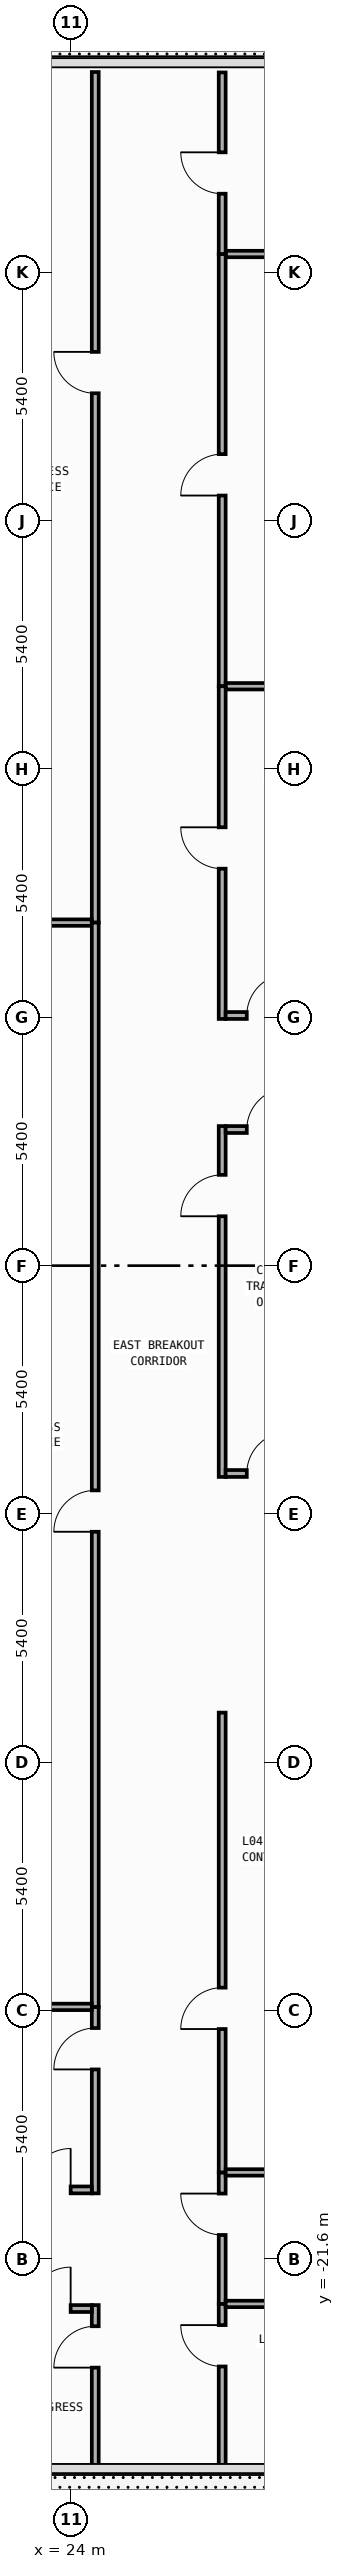
"""IFC4 building model, lengths in metres.
Left out: names, types, materials, properties, quantities, classifications, styles, units other than length and angle.
Written with IfcOpenShell. Run it as: python <this file> out.ifc"""

import sys

from ifc_helpers import new_model, si_unit, direction, frame, frame_2d, origin, place, context, subcontext, project, spatial, rectangle, extrude, element, fill, save


model = new_model("IFC4")
c1 = context("Model", 3, precision=1e-05, world=origin(), true_north=direction((0.0, 1.0)))
c2 = subcontext(c1, "Body", "Model", "MODEL_VIEW")
j1 = project(units=[si_unit("LENGTHUNIT", "METRE"), si_unit("PLANEANGLEUNIT", "RADIAN")], contexts=[c1])
p1 = place(None, origin())
s1 = spatial("IfcSite", under=j1, at=p1, CompositionType="ELEMENT")
p2 = place(p1, origin())
s2 = spatial("IfcBuilding", under=s1, at=p2, CompositionType="ELEMENT")
p3 = place(p2, frame((0.0, 0.0, 16.0)))
s3 = spatial("IfcBuildingStorey", under=s2, at=p3, CompositionType="ELEMENT", Elevation=16.0)
p4 = place(p3, frame((24.52, -26.113, 0.0), z_axis=(0.0, 0.0, 1.0), x_axis=(0.0, 1.0, 0.0)))
e1 = element("IfcWall", 1, at=p4, inside=s3, PredefinedType="PARTITIONING", context=c2, shape_type="SweptSolid", body=[
    extrude(rectangle(XDim=3.508, YDim=0.15, at=frame_2d((1.754, 0.0))), origin(), (0.0, 0.0, 1.0), 4.55),
])
p5 = place(p4, frame((2.148, 0.0, 0.0)))
e2 = element("IfcOpeningElement", 2, at=p5, cuts=e1, PredefinedType="OPENING", context=c2, shape_type="SweptSolid", body=[
    extrude(rectangle(XDim=0.9, YDim=2.15, at=frame_2d((0.45, 1.075))), frame((0.0, 0.085, 0.0), z_axis=(0.0, -1.0, 0.0), x_axis=(1.0, 0.0, 0.0)), (0.0, 0.0, 1.0), 0.17),
])
p6 = place(p3, frame((20.51, -22.68, 0.0), z_axis=(0.0, 0.0, 1.0), x_axis=(1.0, 0.0, 0.0)))
e3 = element("IfcWall", 3, at=p6, inside=s3, PredefinedType="PARTITIONING", context=c2, shape_type="SweptSolid", body=[
    extrude(rectangle(XDim=3.935, YDim=0.15, at=frame_2d((1.968, 0.0))), origin(), (0.0, 0.0, 1.0), 4.55),
])
p7 = place(p6, frame((2.575, 0.0, 0.0)))
e4 = element("IfcOpeningElement", 4, at=p7, cuts=e3, PredefinedType="OPENING", context=c2, shape_type="SweptSolid", body=[
    extrude(rectangle(XDim=0.9, YDim=2.15, at=frame_2d((0.45, 1.075))), frame((0.0, 0.085, 0.0), z_axis=(0.0, -1.0, 0.0), x_axis=(1.0, 0.0, 0.0)), (0.0, 0.0, 1.0), 0.17),
])
p8 = place(p3, frame((27.355, 22.0, 0.0), z_axis=(0.0, 0.0, 1.0), x_axis=(1.0, 0.0, 0.0)))
e5 = element("IfcWall", 5, at=p8, inside=s3, PredefinedType="PARTITIONING", context=c2, shape_type="SweptSolid", body=[
    extrude(rectangle(XDim=9.09, YDim=0.14, at=frame_2d((4.545, 0.0))), origin(), (0.0, 0.0, 1.0), 3.65),
])
p9 = place(p3, frame((27.28, 12.6, 0.0), z_axis=(0.0, 0.0, 1.0), x_axis=(0.0, 1.0, 0.0)))
e6 = element("IfcWall", 6, at=p9, inside=s3, PredefinedType="PARTITIONING", context=c2, shape_type="SweptSolid", body=[
    extrude(rectangle(XDim=9.4, YDim=0.15, at=frame_2d((4.7, 0.0))), origin(), (0.0, 0.0, 1.0), 4.55),
])
p10 = place(p9, frame((4.148, 0.0, 0.0)))
e7 = element("IfcOpeningElement", 7, at=p10, cuts=e6, PredefinedType="OPENING", context=c2, shape_type="SweptSolid", body=[
    extrude(rectangle(XDim=0.9, YDim=2.15, at=frame_2d((0.45, 1.075))), frame((0.0, 0.085, 0.0), z_axis=(0.0, -1.0, 0.0), x_axis=(1.0, 0.0, 0.0)), (0.0, 0.0, 1.0), 0.17),
])
p11 = place(p3, frame((27.355, 12.6, 0.0), z_axis=(0.0, 0.0, 1.0), x_axis=(1.0, 0.0, 0.0)))
e8 = element("IfcWall", 8, at=p11, inside=s3, PredefinedType="PARTITIONING", context=c2, shape_type="SweptSolid", body=[
    extrude(rectangle(XDim=2.645, YDim=0.14, at=frame_2d((1.323, 0.0))), origin(), (0.0, 0.0, 1.0), 3.65),
])
p12 = place(p3, frame((24.52, 7.46, 0.0), z_axis=(0.0, 0.0, 1.0), x_axis=(0.0, 1.0, 0.0)))
e9 = element("IfcWall", 9, at=p12, inside=s3, PredefinedType="PARTITIONING", context=c2, shape_type="SweptSolid", body=[
    extrude(rectangle(XDim=18.498, YDim=0.15, at=frame_2d((9.249, 0.0))), origin(), (0.0, 0.0, 1.0), 4.55),
])
p13 = place(p12, frame((11.512, 0.0, 0.0)))
e10 = element("IfcOpeningElement", 10, at=p13, cuts=e9, PredefinedType="OPENING", context=c2, shape_type="SweptSolid", body=[
    extrude(rectangle(XDim=0.9, YDim=2.15, at=frame_2d((0.45, 1.075))), frame((0.0, 0.085, 0.0), z_axis=(0.0, -1.0, 0.0), x_axis=(1.0, 0.0, 0.0)), (0.0, 0.0, 1.0), 0.17),
])
p14 = place(p3, frame((20.31, 7.46, 0.0), z_axis=(0.0, 0.0, 1.0), x_axis=(1.0, 0.0, 0.0)))
e11 = element("IfcWall", 11, at=p14, inside=s3, PredefinedType="PARTITIONING", context=c2, shape_type="SweptSolid", body=[
    extrude(rectangle(XDim=4.135, YDim=0.14, at=frame_2d((2.067, 0.0))), origin(), (0.0, 0.0, 1.0), 4.55),
])
p15 = place(p3, frame((27.28, 22.0, 0.0), z_axis=(0.0, 0.0, 1.0), x_axis=(0.0, 1.0, 0.0)))
e12 = element("IfcWall", 12, at=p15, inside=s3, PredefinedType="PARTITIONING", context=c2, shape_type="SweptSolid", body=[
    extrude(rectangle(XDim=3.949, YDim=0.15, at=frame_2d((1.975, 0.0))), origin(), (0.0, 0.0, 1.0), 4.55),
])
p16 = place(p15, frame((1.312, 0.0, 0.0)))
e13 = element("IfcOpeningElement", 13, at=p16, cuts=e12, PredefinedType="OPENING", context=c2, shape_type="SweptSolid", body=[
    extrude(rectangle(XDim=0.9, YDim=2.15, at=frame_2d((0.45, 1.075))), frame((0.0, 0.085, 0.0), z_axis=(0.0, -1.0, 0.0), x_axis=(1.0, 0.0, 0.0)), (0.0, 0.0, 1.0), 0.17),
])
p17 = place(p3, frame((27.28, -4.595, 0.0), z_axis=(0.0, 0.0, 1.0), x_axis=(0.0, 1.0, 0.0)))
e14 = element("IfcWall", 14, at=p17, inside=s3, PredefinedType="PARTITIONING", context=c2, shape_type="SweptSolid", body=[
    extrude(rectangle(XDim=7.63, YDim=0.15, at=frame_2d((3.815, 0.0))), origin(), (0.0, 0.0, 1.0), 4.55),
])
p18 = place(p17, frame((5.669, 0.0, 0.0)))
e15 = element("IfcOpeningElement", 15, at=p18, cuts=e14, PredefinedType="OPENING", context=c2, shape_type="SweptSolid", body=[
    extrude(rectangle(XDim=0.9, YDim=2.15, at=frame_2d((0.45, 1.075))), frame((0.0, 0.085, 0.0), z_axis=(0.0, -1.0, 0.0), x_axis=(1.0, 0.0, 0.0)), (0.0, 0.0, 1.0), 0.17),
])
p19 = place(p3, frame((27.28, 5.365, 0.0), z_axis=(0.0, 0.0, 1.0), x_axis=(0.0, 1.0, 0.0)))
e16 = element("IfcWall", 16, at=p19, inside=s3, PredefinedType="PARTITIONING", context=c2, shape_type="SweptSolid", body=[
    extrude(rectangle(XDim=7.235, YDim=0.15, at=frame_2d((3.618, 0.0))), origin(), (0.0, 0.0, 1.0), 4.55),
])
p20 = place(p19, frame((3.268, 0.0, 0.0)))
e17 = element("IfcOpeningElement", 17, at=p20, cuts=e16, PredefinedType="OPENING", context=c2, shape_type="SweptSolid", body=[
    extrude(rectangle(XDim=0.9, YDim=2.15, at=frame_2d((0.45, 1.075))), frame((0.0, 0.085, 0.0), z_axis=(0.0, -1.0, 0.0), x_axis=(1.0, 0.0, 0.0)), (0.0, 0.0, 1.0), 0.17),
])
p21 = place(p3, frame((24.52, -20.175, 0.0), z_axis=(0.0, 0.0, 1.0), x_axis=(0.0, 1.0, 0.0)))
e18 = element("IfcWall", 18, at=p21, inside=s3, PredefinedType="PARTITIONING", context=c2, shape_type="SweptSolid", body=[
    extrude(rectangle(XDim=4.055, YDim=0.15, at=frame_2d((2.027, 0.0))), origin(), (0.0, 0.0, 1.0), 4.55),
])
p22 = place(p21, frame((2.695, 0.0, 0.0)))
e19 = element("IfcOpeningElement", 19, at=p22, cuts=e18, PredefinedType="OPENING", context=c2, shape_type="SweptSolid", body=[
    extrude(rectangle(XDim=0.9, YDim=2.15, at=frame_2d((0.45, 1.075))), frame((0.0, 0.085, 0.0), z_axis=(0.0, -1.0, 0.0), x_axis=(1.0, 0.0, 0.0)), (0.0, 0.0, 1.0), 0.17),
])
p23 = place(p3, frame((27.28, -22.58, 0.0), z_axis=(0.0, 0.0, 1.0), x_axis=(0.0, 1.0, 0.0)))
e20 = element("IfcWall", 20, at=p23, inside=s3, PredefinedType="PARTITIONING", context=c2, shape_type="SweptSolid", body=[
    extrude(rectangle(XDim=2.86, YDim=0.15, at=frame_2d((1.43, 0.0))), origin(), (0.0, 0.0, 1.0), 4.55),
])
p24 = place(p23, frame((1.5, 0.0, 0.0)))
e21 = element("IfcOpeningElement", 21, at=p24, cuts=e20, PredefinedType="OPENING", context=c2, shape_type="SweptSolid", body=[
    extrude(rectangle(XDim=0.9, YDim=2.15, at=frame_2d((0.45, 1.075))), frame((0.0, 0.085, 0.0), z_axis=(0.0, -1.0, 0.0), x_axis=(1.0, 0.0, 0.0)), (0.0, 0.0, 1.0), 0.17),
])
p25 = place(p3, frame((24.52, -16.12, 0.0), z_axis=(0.0, 0.0, 1.0), x_axis=(0.0, 1.0, 0.0)))
e22 = element("IfcWall", 22, at=p25, inside=s3, PredefinedType="PARTITIONING", context=c2, shape_type="SweptSolid", body=[
    extrude(rectangle(XDim=23.58, YDim=0.15, at=frame_2d((11.79, 0.0))), origin(), (0.0, 0.0, 1.0), 4.55),
])
p26 = place(p25, frame((10.333, 0.0, 0.0)))
e23 = element("IfcOpeningElement", 23, at=p26, cuts=e22, PredefinedType="OPENING", context=c2, shape_type="SweptSolid", body=[
    extrude(rectangle(XDim=0.9, YDim=2.15, at=frame_2d((0.45, 1.075))), frame((0.0, 0.085, 0.0), z_axis=(0.0, -1.0, 0.0), x_axis=(1.0, 0.0, 0.0)), (0.0, 0.0, 1.0), 0.17),
])
p27 = place(p3, frame((27.28, -26.121, 0.0), z_axis=(0.0, 0.0, 1.0), x_axis=(0.0, 1.0, 0.0)))
e24 = element("IfcWall", 24, at=p27, inside=s3, PredefinedType="PARTITIONING", context=c2, shape_type="SweptSolid", body=[
    extrude(rectangle(XDim=3.541, YDim=0.15, at=frame_2d((1.771, 0.0))), origin(), (0.0, 0.0, 1.0), 4.55),
])
p28 = place(p27, frame((2.181, 0.0, 0.0)))
e25 = element("IfcOpeningElement", 25, at=p28, cuts=e24, PredefinedType="OPENING", context=c2, shape_type="SweptSolid", body=[
    extrude(rectangle(XDim=0.9, YDim=2.15, at=frame_2d((0.45, 1.075))), frame((0.0, 0.085, 0.0), z_axis=(0.0, -1.0, 0.0), x_axis=(1.0, 0.0, 0.0)), (0.0, 0.0, 1.0), 0.17),
])
p29 = place(p3, frame((27.28, -19.72, 0.0), z_axis=(0.0, 0.0, 1.0), x_axis=(0.0, 1.0, 0.0)))
e26 = element("IfcWall", 26, at=p29, inside=s3, PredefinedType="PARTITIONING", context=c2, shape_type="SweptSolid", body=[
    extrude(rectangle(XDim=10.0, YDim=0.15, at=frame_2d((5.0, 0.0))), origin(), (0.0, 0.0, 1.0), 4.55),
])
p30 = place(p29, frame((3.118, 0.0, 0.0)))
e27 = element("IfcOpeningElement", 27, at=p30, cuts=e26, PredefinedType="OPENING", context=c2, shape_type="SweptSolid", body=[
    extrude(rectangle(XDim=0.9, YDim=2.15, at=frame_2d((0.45, 1.075))), frame((0.0, 0.085, 0.0), z_axis=(0.0, -1.0, 0.0), x_axis=(1.0, 0.0, 0.0)), (0.0, 0.0, 1.0), 0.17),
])
p31 = place(p3, frame((27.355, 2.96, 0.0), z_axis=(0.0, 0.0, 1.0), x_axis=(1.0, 0.0, 0.0)))
e28 = element("IfcWall", 28, at=p31, inside=s3, PredefinedType="PARTITIONING", context=c2, shape_type="SweptSolid", body=[
    extrude(rectangle(XDim=2.645, YDim=0.15, at=frame_2d((1.323, 0.0))), origin(), (0.0, 0.0, 1.0), 4.55),
])
p32 = place(p31, frame((0.46, 0.0, 0.0)))
e29 = element("IfcOpeningElement", 29, at=p32, cuts=e28, PredefinedType="OPENING", context=c2, shape_type="SweptSolid", body=[
    extrude(rectangle(XDim=0.9, YDim=2.15, at=frame_2d((0.45, 1.075))), frame((0.0, 0.085, 0.0), z_axis=(0.0, -1.0, 0.0), x_axis=(1.0, 0.0, 0.0)), (0.0, 0.0, 1.0), 0.17),
])
p33 = place(p3, frame((27.355, 5.44, 0.0), z_axis=(0.0, 0.0, 1.0), x_axis=(1.0, 0.0, 0.0)))
e30 = element("IfcWall", 30, at=p33, inside=s3, PredefinedType="PARTITIONING", context=c2, shape_type="SweptSolid", body=[
    extrude(rectangle(XDim=2.645, YDim=0.15, at=frame_2d((1.323, 0.0))), origin(), (0.0, 0.0, 1.0), 3.65),
])
p34 = place(p33, frame((0.46, 0.0, 0.0)))
e31 = element("IfcOpeningElement", 31, at=p34, cuts=e30, PredefinedType="OPENING", context=c2, shape_type="SweptSolid", body=[
    extrude(rectangle(XDim=0.9, YDim=2.15, at=frame_2d((0.45, 1.075))), frame((0.0, 0.085, 0.0), z_axis=(0.0, -1.0, 0.0), x_axis=(1.0, 0.0, 0.0)), (0.0, 0.0, 1.0), 0.17),
])
p35 = place(p3, frame((20.56, -20.1, 0.0), z_axis=(0.0, 0.0, 1.0), x_axis=(1.0, 0.0, 0.0)))
e32 = element("IfcWall", 32, at=p35, inside=s3, PredefinedType="PARTITIONING", context=c2, shape_type="SweptSolid", body=[
    extrude(rectangle(XDim=3.885, YDim=0.15, at=frame_2d((1.942, 0.0))), origin(), (0.0, 0.0, 1.0), 4.55),
])
p36 = place(p35, frame((2.525, 0.0, 0.0)))
e33 = element("IfcOpeningElement", 33, at=p36, cuts=e32, PredefinedType="OPENING", context=c2, shape_type="SweptSolid", body=[
    extrude(rectangle(XDim=0.9, YDim=2.15, at=frame_2d((0.45, 1.075))), frame((0.0, 0.085, 0.0), z_axis=(0.0, -1.0, 0.0), x_axis=(1.0, 0.0, 0.0)), (0.0, 0.0, 1.0), 0.17),
])
p37 = place(p3, frame((27.355, -4.52, 0.0), z_axis=(0.0, 0.0, 1.0), x_axis=(1.0, 0.0, 0.0)))
e34 = element("IfcWall", 34, at=p37, inside=s3, PredefinedType="PARTITIONING", context=c2, shape_type="SweptSolid", body=[
    extrude(rectangle(XDim=2.645, YDim=0.15, at=frame_2d((1.323, 0.0))), origin(), (0.0, 0.0, 1.0), 4.55),
])
p38 = place(p37, frame((0.46, 0.0, 0.0)))
e35 = element("IfcOpeningElement", 35, at=p38, cuts=e34, PredefinedType="OPENING", context=c2, shape_type="SweptSolid", body=[
    extrude(rectangle(XDim=0.9, YDim=2.15, at=frame_2d((0.45, 1.075))), frame((0.0, 0.085, 0.0), z_axis=(0.0, -1.0, 0.0), x_axis=(1.0, 0.0, 0.0)), (0.0, 0.0, 1.0), 0.17),
])
p39 = place(p3, frame((20.4, -16.12, 0.0), z_axis=(0.0, 0.0, 1.0), x_axis=(1.0, 0.0, 0.0)))
e36 = element("IfcWall", 36, at=p39, inside=s3, PredefinedType="PARTITIONING", context=c2, shape_type="SweptSolid", body=[
    extrude(rectangle(XDim=4.045, YDim=0.14, at=frame_2d((2.022, 0.0))), origin(), (0.0, 0.0, 1.0), 4.55),
])
p40 = place(p3, frame((27.355, -22.58, 0.0), z_axis=(0.0, 0.0, 1.0), x_axis=(1.0, 0.0, 0.0)))
e37 = element("IfcWall", 37, at=p40, inside=s3, PredefinedType="PARTITIONING", context=c2, shape_type="SweptSolid", body=[
    extrude(rectangle(XDim=3.085, YDim=0.14, at=frame_2d((1.542, 0.0))), origin(), (0.0, 0.0, 1.0), 4.55),
])
p41 = place(p3, frame((27.355, -19.72, 0.0), z_axis=(0.0, 0.0, 1.0), x_axis=(1.0, 0.0, 0.0)))
e38 = element("IfcWall", 38, at=p41, inside=s3, PredefinedType="PARTITIONING", context=c2, shape_type="SweptSolid", body=[
    extrude(rectangle(XDim=2.975, YDim=0.14, at=frame_2d((1.488, 0.0))), origin(), (0.0, 0.0, 1.0), 4.55),
])
p42 = place(p5, origin())
e39 = element("IfcDoor", 39, at=p42, inside=s3, OperationType="SINGLE_SWING_LEFT", PredefinedType="DOOR", context=c2, shape_type="SweptSolid", body=[
    extrude(rectangle(XDim=0.9, YDim=2.15, at=frame_2d((0.45, 1.075))), frame((0.0, 0.025, 0.0), z_axis=(0.0, -1.0, 0.0), x_axis=(1.0, 0.0, 0.0)), (0.0, 0.0, 1.0), 0.05),
])
fill(e2, e39)
p43 = place(p7, origin())
e40 = element("IfcDoor", 40, at=p43, inside=s3, OperationType="SINGLE_SWING_RIGHT", PredefinedType="DOOR", context=c2, shape_type="SweptSolid", body=[
    extrude(rectangle(XDim=0.9, YDim=2.15, at=frame_2d((0.45, 1.075))), frame((0.0, 0.025, 0.0), z_axis=(0.0, -1.0, 0.0), x_axis=(1.0, 0.0, 0.0)), (0.0, 0.0, 1.0), 0.05),
])
fill(e4, e40)
p44 = place(p10, origin())
e41 = element("IfcDoor", 41, at=p44, inside=s3, OperationType="SINGLE_SWING_LEFT", PredefinedType="DOOR", context=c2, shape_type="SweptSolid", body=[
    extrude(rectangle(XDim=0.9, YDim=2.15, at=frame_2d((0.45, 1.075))), frame((0.0, 0.025, 0.0), z_axis=(0.0, -1.0, 0.0), x_axis=(1.0, 0.0, 0.0)), (0.0, 0.0, 1.0), 0.05),
])
fill(e7, e41)
p45 = place(p13, origin())
e42 = element("IfcDoor", 42, at=p45, inside=s3, OperationType="SINGLE_SWING_RIGHT", PredefinedType="DOOR", context=c2, shape_type="SweptSolid", body=[
    extrude(rectangle(XDim=0.9, YDim=2.15, at=frame_2d((0.45, 1.075))), frame((0.0, 0.025, 0.0), z_axis=(0.0, -1.0, 0.0), x_axis=(1.0, 0.0, 0.0)), (0.0, 0.0, 1.0), 0.05),
])
fill(e10, e42)
p46 = place(p16, origin())
e43 = element("IfcDoor", 43, at=p46, inside=s3, OperationType="SINGLE_SWING_RIGHT", PredefinedType="DOOR", context=c2, shape_type="SweptSolid", body=[
    extrude(rectangle(XDim=0.9, YDim=2.15, at=frame_2d((0.45, 1.075))), frame((0.0, 0.025, 0.0), z_axis=(0.0, -1.0, 0.0), x_axis=(1.0, 0.0, 0.0)), (0.0, 0.0, 1.0), 0.05),
])
fill(e13, e43)
p47 = place(p18, origin())
e44 = element("IfcDoor", 44, at=p47, inside=s3, OperationType="SINGLE_SWING_LEFT", PredefinedType="DOOR", context=c2, shape_type="SweptSolid", body=[
    extrude(rectangle(XDim=0.9, YDim=2.15, at=frame_2d((0.45, 1.075))), frame((0.0, 0.025, 0.0), z_axis=(0.0, -1.0, 0.0), x_axis=(1.0, 0.0, 0.0)), (0.0, 0.0, 1.0), 0.05),
])
fill(e15, e44)
p48 = place(p20, origin())
e45 = element("IfcDoor", 45, at=p48, inside=s3, OperationType="SINGLE_SWING_RIGHT", PredefinedType="DOOR", context=c2, shape_type="SweptSolid", body=[
    extrude(rectangle(XDim=0.9, YDim=2.15, at=frame_2d((0.45, 1.075))), frame((0.0, 0.025, 0.0), z_axis=(0.0, -1.0, 0.0), x_axis=(1.0, 0.0, 0.0)), (0.0, 0.0, 1.0), 0.05),
])
fill(e17, e45)
p49 = place(p22, origin())
e46 = element("IfcDoor", 46, at=p49, inside=s3, OperationType="SINGLE_SWING_LEFT", PredefinedType="DOOR", context=c2, shape_type="SweptSolid", body=[
    extrude(rectangle(XDim=0.9, YDim=2.15, at=frame_2d((0.45, 1.075))), frame((0.0, 0.025, 0.0), z_axis=(0.0, -1.0, 0.0), x_axis=(1.0, 0.0, 0.0)), (0.0, 0.0, 1.0), 0.05),
])
fill(e19, e46)
p50 = place(p24, origin())
e47 = element("IfcDoor", 47, at=p50, inside=s3, OperationType="SINGLE_SWING_RIGHT", PredefinedType="DOOR", context=c2, shape_type="SweptSolid", body=[
    extrude(rectangle(XDim=0.9, YDim=2.15, at=frame_2d((0.45, 1.075))), frame((0.0, 0.025, 0.0), z_axis=(0.0, -1.0, 0.0), x_axis=(1.0, 0.0, 0.0)), (0.0, 0.0, 1.0), 0.05),
])
fill(e21, e47)
p51 = place(p26, origin())
e48 = element("IfcDoor", 48, at=p51, inside=s3, OperationType="SINGLE_SWING_LEFT", PredefinedType="DOOR", context=c2, shape_type="SweptSolid", body=[
    extrude(rectangle(XDim=0.9, YDim=2.15, at=frame_2d((0.45, 1.075))), frame((0.0, 0.025, 0.0), z_axis=(0.0, -1.0, 0.0), x_axis=(1.0, 0.0, 0.0)), (0.0, 0.0, 1.0), 0.05),
])
fill(e23, e48)
p52 = place(p28, origin())
e49 = element("IfcDoor", 49, at=p52, inside=s3, OperationType="SINGLE_SWING_RIGHT", PredefinedType="DOOR", context=c2, shape_type="SweptSolid", body=[
    extrude(rectangle(XDim=0.9, YDim=2.15, at=frame_2d((0.45, 1.075))), frame((0.0, 0.025, 0.0), z_axis=(0.0, -1.0, 0.0), x_axis=(1.0, 0.0, 0.0)), (0.0, 0.0, 1.0), 0.05),
])
fill(e25, e49)
p53 = place(p30, origin())
e50 = element("IfcDoor", 50, at=p53, inside=s3, OperationType="SINGLE_SWING_LEFT", PredefinedType="DOOR", context=c2, shape_type="SweptSolid", body=[
    extrude(rectangle(XDim=0.9, YDim=2.15, at=frame_2d((0.45, 1.075))), frame((0.0, 0.025, 0.0), z_axis=(0.0, -1.0, 0.0), x_axis=(1.0, 0.0, 0.0)), (0.0, 0.0, 1.0), 0.05),
])
fill(e27, e50)
p54 = place(p32, origin())
e51 = element("IfcDoor", 51, at=p54, inside=s3, OperationType="SINGLE_SWING_RIGHT", PredefinedType="DOOR", context=c2, shape_type="SweptSolid", body=[
    extrude(rectangle(XDim=0.9, YDim=2.15, at=frame_2d((0.45, 1.075))), frame((0.0, 0.025, 0.0), z_axis=(0.0, -1.0, 0.0), x_axis=(1.0, 0.0, 0.0)), (0.0, 0.0, 1.0), 0.05),
])
fill(e29, e51)
p55 = place(p34, origin())
e52 = element("IfcDoor", 52, at=p55, inside=s3, OperationType="SINGLE_SWING_RIGHT", PredefinedType="DOOR", context=c2, shape_type="SweptSolid", body=[
    extrude(rectangle(XDim=0.9, YDim=2.15, at=frame_2d((0.45, 1.075))), frame((0.0, 0.025, 0.0), z_axis=(0.0, -1.0, 0.0), x_axis=(1.0, 0.0, 0.0)), (0.0, 0.0, 1.0), 0.05),
])
fill(e31, e52)
p56 = place(p36, origin())
e53 = element("IfcDoor", 53, at=p56, inside=s3, OperationType="SINGLE_SWING_RIGHT", PredefinedType="DOOR", context=c2, shape_type="SweptSolid", body=[
    extrude(rectangle(XDim=0.9, YDim=2.15, at=frame_2d((0.45, 1.075))), frame((0.0, 0.025, 0.0), z_axis=(0.0, -1.0, 0.0), x_axis=(1.0, 0.0, 0.0)), (0.0, 0.0, 1.0), 0.05),
])
fill(e33, e53)
p57 = place(p38, origin())
e54 = element("IfcDoor", 54, at=p57, inside=s3, OperationType="SINGLE_SWING_RIGHT", PredefinedType="DOOR", context=c2, shape_type="SweptSolid", body=[
    extrude(rectangle(XDim=0.9, YDim=2.15, at=frame_2d((0.45, 1.075))), frame((0.0, 0.025, 0.0), z_axis=(0.0, -1.0, 0.0), x_axis=(1.0, 0.0, 0.0)), (0.0, 0.0, 1.0), 0.05),
])
fill(e35, e54)
save(model, sys.argv[1])
